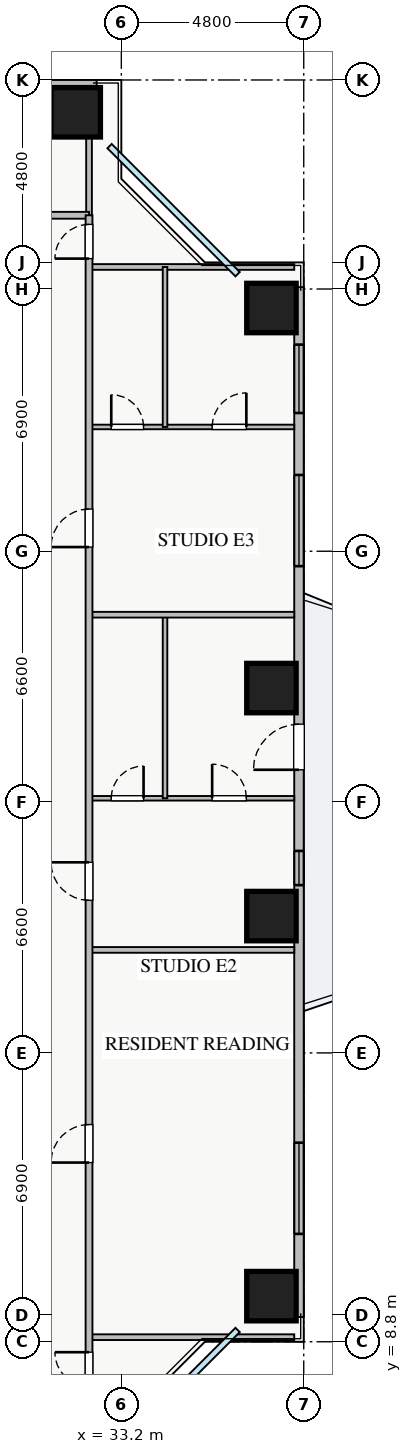
"""IFC4 building model, lengths in metres.
Left out: names, types, materials, properties, quantities, classifications, styles, units other than length and angle.
Written with IfcOpenShell. Run it as: python <this file> out.ifc"""

import sys

from ifc_helpers import new_model, si_unit, direction, frame, frame_2d, origin, origin_2d, place, context, subcontext, project, spatial, rectangle, extrude, source, transform, mapped, element, fill, save


model = new_model("IFC4")
c1 = context("Model", 3, precision=1e-05, world=origin(), true_north=direction((0.0, 1.0)))
c2 = subcontext(c1, "Body", "Model", "MODEL_VIEW")
j1 = project(units=[si_unit("LENGTHUNIT", "METRE"), si_unit("PLANEANGLEUNIT", "RADIAN")], contexts=[c1])
p1 = place(None, origin())
s1 = spatial("IfcSite", under=j1, at=p1, CompositionType="ELEMENT")
p2 = place(p1, origin())
s2 = spatial("IfcBuilding", under=s1, at=p2, CompositionType="ELEMENT")
p3 = place(p2, frame((0.0, 0.0, 39.25)))
s3 = spatial("IfcBuildingStorey", under=s2, at=p3, CompositionType="ELEMENT", Elevation=39.25)
m1 = source(origin(), c2, "Body", "SweptSolid", [
    extrude(rectangle(XDim=1.3, YDim=1.3, at=origin_2d()), origin(), (0.0, 0.0, 1.0), 3.25),
])
for number, where, z_axis, x_axis in (
    (1, (37.15, 10.0, 0.0), (0.0, 0.0, 1.0), (1.0, 0.0, 0.0)),
    (2, (37.15, 20.0, 0.0), (0.0, 0.0, 1.0), (1.0, 0.0, 0.0)),
    (3, (37.15, 26.0, 0.0), (0.0, 0.0, 1.0), (1.0, 0.0, 0.0)),
    (4, (37.15, 36.0, 0.0), (0.0, 0.0, 1.0), (1.0, 0.0, 0.0)),
    (5, (32.0, 41.15, 0.0), (0.0, 0.0, 1.0), (1.0, 0.0, 0.0)),
):
    element("IfcColumn", number, at=place(p3, frame(where, z_axis=z_axis, x_axis=x_axis)), inside=s3, PredefinedType="COLUMN", context=c2, shape_type="MappedRepresentation", body=[
        mapped(m1, transform((0.0, 0.0, 0.0), x_axis=(1.0, 0.0, 0.0), y_axis=(0.0, 1.0, 0.0), z_axis=(0.0, 0.0, 1.0), scale=1.0)),
    ])
p4 = place(p3, frame((5.45, 41.875, 0.0), z_axis=(0.0, 0.0, 1.0), x_axis=(1.0, 0.0, 0.0)))
e6 = element("IfcWall", 6, at=p4, inside=s3, PredefinedType="STANDARD", context=c2, shape_type="SweptSolid", body=[
    extrude(rectangle(XDim=27.1, YDim=0.25, at=frame_2d((13.55, 0.0))), origin(), (0.0, 0.0, 1.0), 2.61),
])
p5 = place(p4, frame((14.4, 0.0, 0.0)))
e7 = element("IfcOpeningElement", 7, at=p5, cuts=e6, PredefinedType="OPENING", context=c2, shape_type="SweptSolid", body=[
    extrude(rectangle(XDim=1.2, YDim=2.1, at=frame_2d((0.6, 1.05))), frame((0.0, 0.135, 0.0), z_axis=(0.0, -1.0, 0.0), x_axis=(1.0, 0.0, 0.0)), (0.0, 0.0, 1.0), 0.27),
])
p6 = place(p4, frame((1.45, 0.0, 0.9)))
e8 = element("IfcOpeningElement", 8, at=p6, cuts=e6, PredefinedType="OPENING", context=c2, shape_type="SweptSolid", body=[
    extrude(rectangle(XDim=1.5, YDim=1.5, at=frame_2d((0.75, 0.75))), frame((0.0, 0.135, 0.0), z_axis=(0.0, -1.0, 0.0), x_axis=(1.0, 0.0, 0.0)), (0.0, 0.0, 1.0), 0.27),
])
p7 = place(p4, frame((7.82, 0.0, 0.9)))
e9 = element("IfcOpeningElement", 9, at=p7, cuts=e6, PredefinedType="OPENING", context=c2, shape_type="SweptSolid", body=[
    extrude(rectangle(XDim=1.8, YDim=1.5, at=frame_2d((0.9, 0.75))), frame((0.0, 0.135, 0.0), z_axis=(0.0, -1.0, 0.0), x_axis=(1.0, 0.0, 0.0)), (0.0, 0.0, 1.0), 0.27),
])
p8 = place(p4, frame((17.92, 0.0, 0.9)))
e10 = element("IfcOpeningElement", 10, at=p8, cuts=e6, PredefinedType="OPENING", context=c2, shape_type="SweptSolid", body=[
    extrude(rectangle(XDim=1.5, YDim=1.5, at=frame_2d((0.75, 0.75))), frame((0.0, 0.135, 0.0), z_axis=(0.0, -1.0, 0.0), x_axis=(1.0, 0.0, 0.0)), (0.0, 0.0, 1.0), 0.27),
])
p9 = place(p4, frame((22.663, 0.0, 0.9)))
e11 = element("IfcOpeningElement", 11, at=p9, cuts=e6, PredefinedType="OPENING", context=c2, shape_type="SweptSolid", body=[
    extrude(rectangle(XDim=2.1, YDim=1.48, at=frame_2d((1.05, 0.74))), frame((0.0, 0.135, 0.0), z_axis=(0.0, -1.0, 0.0), x_axis=(1.0, 0.0, 0.0)), (0.0, 0.0, 1.0), 0.27),
])
p10 = place(p4, frame((5.084, 0.0, 0.9)))
e12 = element("IfcOpeningElement", 12, at=p10, cuts=e6, PredefinedType="OPENING", context=c2, shape_type="SweptSolid", body=[
    extrude(rectangle(XDim=2.4, YDim=1.5, at=frame_2d((1.2, 0.75))), frame((0.0, 0.135, 0.0), z_axis=(0.0, -1.0, 0.0), x_axis=(1.0, 0.0, 0.0)), (0.0, 0.0, 1.0), 0.27),
])
p11 = place(p4, frame((11.002, 0.0, 0.9)))
e13 = element("IfcOpeningElement", 13, at=p11, cuts=e6, PredefinedType="OPENING", context=c2, shape_type="SweptSolid", body=[
    extrude(rectangle(XDim=2.4, YDim=1.5, at=frame_2d((1.2, 0.75))), frame((0.0, 0.135, 0.0), z_axis=(0.0, -1.0, 0.0), x_axis=(1.0, 0.0, 0.0)), (0.0, 0.0, 1.0), 0.27),
])
p12 = place(p3, frame((37.875, 9.45, 0.0), z_axis=(0.0, 0.0, 1.0), x_axis=(0.0, 1.0, 0.0)))
e14 = element("IfcWall", 14, at=p12, inside=s3, PredefinedType="STANDARD", context=c2, shape_type="SweptSolid", body=[
    extrude(rectangle(XDim=27.1, YDim=0.25, at=frame_2d((13.55, 0.0))), origin(), (0.0, 0.0, 1.0), 2.61),
])
p13 = place(p12, frame((14.4, 0.0, 0.0)))
e15 = element("IfcOpeningElement", 15, at=p13, cuts=e14, PredefinedType="OPENING", context=c2, shape_type="SweptSolid", body=[
    extrude(rectangle(XDim=1.2, YDim=2.1, at=frame_2d((0.6, 1.05))), frame((0.0, 0.135, 0.0), z_axis=(0.0, -1.0, 0.0), x_axis=(1.0, 0.0, 0.0)), (0.0, 0.0, 1.0), 0.27),
])
p14 = place(p12, frame((2.188, 0.0, 0.9)))
e16 = element("IfcOpeningElement", 16, at=p14, cuts=e14, PredefinedType="OPENING", context=c2, shape_type="SweptSolid", body=[
    extrude(rectangle(XDim=2.4, YDim=1.48, at=frame_2d((1.2, 0.74))), frame((0.0, 0.135, 0.0), z_axis=(0.0, -1.0, 0.0), x_axis=(1.0, 0.0, 0.0)), (0.0, 0.0, 1.0), 0.27),
])
p15 = place(p12, frame((23.788, 0.0, 0.9)))
e17 = element("IfcOpeningElement", 17, at=p15, cuts=e14, PredefinedType="OPENING", context=c2, shape_type="SweptSolid", body=[
    extrude(rectangle(XDim=1.8, YDim=1.5, at=frame_2d((0.9, 0.75))), frame((0.0, 0.135, 0.0), z_axis=(0.0, -1.0, 0.0), x_axis=(1.0, 0.0, 0.0)), (0.0, 0.0, 1.0), 0.27),
])
p16 = place(p12, frame((19.758, 0.0, 0.9)))
e18 = element("IfcOpeningElement", 18, at=p16, cuts=e14, PredefinedType="OPENING", context=c2, shape_type="SweptSolid", body=[
    extrude(rectangle(XDim=2.4, YDim=1.5, at=frame_2d((1.2, 0.75))), frame((0.0, 0.135, 0.0), z_axis=(0.0, -1.0, 0.0), x_axis=(1.0, 0.0, 0.0)), (0.0, 0.0, 1.0), 0.27),
])
p17 = place(p12, frame((11.365, 0.0, 0.9)))
e19 = element("IfcOpeningElement", 19, at=p17, cuts=e14, PredefinedType="OPENING", context=c2, shape_type="SweptSolid", body=[
    extrude(rectangle(XDim=0.9, YDim=1.2, at=frame_2d((0.45, 0.6))), frame((0.0, 0.135, 0.0), z_axis=(0.0, -1.0, 0.0), x_axis=(1.0, 0.0, 0.0)), (0.0, 0.0, 1.0), 0.27),
])
p18 = place(p3, frame((32.35, 38.44, 0.0), z_axis=(0.0, 0.0, 1.0), x_axis=(0.0, 1.0, 0.0)))
e20 = element("IfcWall", 20, at=p18, inside=s3, PredefinedType="PARTITIONING", context=c2, shape_type="SweptSolid", body=[
    extrude(rectangle(XDim=3.31, YDim=0.15, at=frame_2d((1.655, 0.0))), origin(), (0.0, 0.0, 1.0), 3.07),
])
p19 = place(p3, frame((8.72, 38.44, 0.0), z_axis=(0.0, 0.0, 1.0), x_axis=(1.0, 0.0, 0.0)))
e21 = element("IfcWall", 21, at=p19, inside=s3, PredefinedType="PARTITIONING", context=c2, shape_type="SweptSolid", body=[
    extrude(rectangle(XDim=23.63, YDim=0.18, at=frame_2d((11.815, 0.0))), origin(), (0.0, 0.0, 1.0), 3.07),
])
p20 = place(p19, frame((2.86, 0.0, 0.0)))
e22 = element("IfcOpeningElement", 22, at=p20, cuts=e21, PredefinedType="OPENING", context=c2, shape_type="SweptSolid", body=[
    extrude(rectangle(XDim=1.0, YDim=2.05, at=frame_2d((0.5, 1.025))), frame((0.0, 0.1, 0.0), z_axis=(0.0, -1.0, 0.0), x_axis=(1.0, 0.0, 0.0)), (0.0, 0.0, 1.0), 0.2),
])
p21 = place(p19, frame((9.4, 0.0, 0.0)))
e23 = element("IfcOpeningElement", 23, at=p21, cuts=e21, PredefinedType="OPENING", context=c2, shape_type="SweptSolid", body=[
    extrude(rectangle(XDim=1.0, YDim=2.05, at=frame_2d((0.5, 1.025))), frame((0.0, 0.1, 0.0), z_axis=(0.0, -1.0, 0.0), x_axis=(1.0, 0.0, 0.0)), (0.0, 0.0, 1.0), 0.2),
])
p22 = place(p19, frame((14.9, 0.0, 0.0)))
e24 = element("IfcOpeningElement", 24, at=p22, cuts=e21, PredefinedType="OPENING", context=c2, shape_type="SweptSolid", body=[
    extrude(rectangle(XDim=1.0, YDim=2.05, at=frame_2d((0.5, 1.025))), frame((0.0, 0.1, 0.0), z_axis=(0.0, -1.0, 0.0), x_axis=(1.0, 0.0, 0.0)), (0.0, 0.0, 1.0), 0.2),
])
p23 = place(p19, frame((20.175, 0.0, 0.0)))
e25 = element("IfcOpeningElement", 25, at=p23, cuts=e21, PredefinedType="OPENING", context=c2, shape_type="SweptSolid", body=[
    extrude(rectangle(XDim=1.0, YDim=2.05, at=frame_2d((0.5, 1.025))), frame((0.0, 0.1, 0.0), z_axis=(0.0, -1.0, 0.0), x_axis=(1.0, 0.0, 0.0)), (0.0, 0.0, 1.0), 0.2),
])
for number, where, z_axis, x_axis in (
    (26, (32.35, 37.08, 0.0), (0.0, 0.0, 1.0), (1.0, 0.0, 0.0)),
    (27, (32.35, 8.92, 0.0), (0.0, 0.0, 1.0), (1.0, 0.0, 0.0)),
):
    element("IfcWall", number, at=place(p3, frame(where, z_axis=z_axis, x_axis=x_axis)), inside=s3, PredefinedType="PARTITIONING", context=c2, shape_type="SweptSolid", body=[
        extrude(rectangle(XDim=5.4, YDim=0.15, at=frame_2d((2.7, 0.0))), origin(), (0.0, 0.0, 1.0), 3.07),
    ])
p24 = place(p3, frame((32.35, 23.1, 0.0), z_axis=(0.0, 0.0, 1.0), x_axis=(1.0, 0.0, 0.0)))
e28 = element("IfcWall", 28, at=p24, inside=s3, PredefinedType="PLUMBINGWALL", context=c2, shape_type="SweptSolid", body=[
    extrude(rectangle(XDim=5.4, YDim=0.12, at=frame_2d((2.7, 0.0))), origin(), (0.0, 0.0, 1.0), 3.07),
])
p25 = place(p24, frame((0.585, 0.0, 0.0)))
e29 = element("IfcOpeningElement", 29, at=p25, cuts=e28, PredefinedType="OPENING", context=c2, shape_type="SweptSolid", body=[
    extrude(rectangle(XDim=0.85, YDim=2.05, at=frame_2d((0.425, 1.025))), frame((0.0, 0.07, 0.0), z_axis=(0.0, -1.0, 0.0), x_axis=(1.0, 0.0, 0.0)), (0.0, 0.0, 1.0), 0.14),
])
p26 = place(p24, frame((3.24, 0.0, 0.0)))
e30 = element("IfcOpeningElement", 30, at=p26, cuts=e28, PredefinedType="OPENING", context=c2, shape_type="SweptSolid", body=[
    extrude(rectangle(XDim=0.9, YDim=2.05, at=frame_2d((0.45, 1.025))), frame((0.0, 0.07, 0.0), z_axis=(0.0, -1.0, 0.0), x_axis=(1.0, 0.0, 0.0)), (0.0, 0.0, 1.0), 0.14),
])
p27 = place(p3, frame((34.35, 23.1, 0.0), z_axis=(0.0, 0.0, 1.0), x_axis=(0.0, 1.0, 0.0)))
e31 = element("IfcWall", 31, at=p27, inside=s3, PredefinedType="PLUMBINGWALL", context=c2, shape_type="SweptSolid", body=[
    extrude(rectangle(XDim=4.83, YDim=0.12, at=frame_2d((2.415, 0.0))), origin(), (0.0, 0.0, 1.0), 3.07),
])
p28 = place(p3, frame((32.35, 19.11, 0.0), z_axis=(0.0, 0.0, 1.0), x_axis=(1.0, 0.0, 0.0)))
e32 = element("IfcWall", 32, at=p28, inside=s3, PredefinedType="PARTITIONING", context=c2, shape_type="SweptSolid", body=[
    extrude(rectangle(XDim=5.4, YDim=0.15, at=frame_2d((2.7, 0.0))), origin(), (0.0, 0.0, 1.0), 3.07),
])
p29 = place(p3, frame((32.35, 32.87, 0.0), z_axis=(0.0, 0.0, 1.0), x_axis=(1.0, 0.0, 0.0)))
e33 = element("IfcWall", 33, at=p29, inside=s3, PredefinedType="PLUMBINGWALL", context=c2, shape_type="SweptSolid", body=[
    extrude(rectangle(XDim=5.4, YDim=0.12, at=frame_2d((2.7, 0.0))), origin(), (0.0, 0.0, 1.0), 3.07),
])
p30 = place(p29, frame((0.585, 0.0, 0.0)))
e34 = element("IfcOpeningElement", 34, at=p30, cuts=e33, PredefinedType="OPENING", context=c2, shape_type="SweptSolid", body=[
    extrude(rectangle(XDim=0.85, YDim=2.05, at=frame_2d((0.425, 1.025))), frame((0.0, 0.07, 0.0), z_axis=(0.0, -1.0, 0.0), x_axis=(1.0, 0.0, 0.0)), (0.0, 0.0, 1.0), 0.14),
])
p31 = place(p29, frame((3.24, 0.0, 0.0)))
e35 = element("IfcOpeningElement", 35, at=p31, cuts=e33, PredefinedType="OPENING", context=c2, shape_type="SweptSolid", body=[
    extrude(rectangle(XDim=0.9, YDim=2.05, at=frame_2d((0.45, 1.025))), frame((0.0, 0.07, 0.0), z_axis=(0.0, -1.0, 0.0), x_axis=(1.0, 0.0, 0.0)), (0.0, 0.0, 1.0), 0.14),
])
p32 = place(p3, frame((34.35, 32.87, 0.0), z_axis=(0.0, 0.0, 1.0), x_axis=(0.0, 1.0, 0.0)))
e36 = element("IfcWall", 36, at=p32, inside=s3, PredefinedType="PLUMBINGWALL", context=c2, shape_type="SweptSolid", body=[
    extrude(rectangle(XDim=4.21, YDim=0.12, at=frame_2d((2.105, 0.0))), origin(), (0.0, 0.0, 1.0), 3.07),
])
p33 = place(p3, frame((32.35, 27.93, 0.0), z_axis=(0.0, 0.0, 1.0), x_axis=(1.0, 0.0, 0.0)))
e37 = element("IfcWall", 37, at=p33, inside=s3, PredefinedType="PARTITIONING", context=c2, shape_type="SweptSolid", body=[
    extrude(rectangle(XDim=5.4, YDim=0.15, at=frame_2d((2.7, 0.0))), origin(), (0.0, 0.0, 1.0), 2.765),
])
p34 = place(p3, frame((32.35, 7.21, 0.0), z_axis=(0.0, 0.0, 1.0), x_axis=(0.0, 1.0, 0.0)))
e38 = element("IfcWall", 38, at=p34, inside=s3, PredefinedType="PARTITIONING", context=c2, shape_type="SweptSolid", body=[
    extrude(rectangle(XDim=31.23, YDim=0.18, at=frame_2d((15.615, 0.0))), origin(), (0.0, 0.0, 1.0), 2.821),
])
p35 = place(p34, frame((30.09, 0.0, 0.0)))
e39 = element("IfcOpeningElement", 39, at=p35, cuts=e38, PredefinedType="OPENING", context=c2, shape_type="SweptSolid", body=[
    extrude(rectangle(XDim=0.9, YDim=2.05, at=frame_2d((0.45, 1.025))), frame((0.0, 0.1, 0.0), z_axis=(0.0, -1.0, 0.0), x_axis=(1.0, 0.0, 0.0)), (0.0, 0.0, 1.0), 0.2),
])
p36 = place(p34, frame((0.415, 0.0, 0.0)))
e40 = element("IfcOpeningElement", 40, at=p36, cuts=e38, PredefinedType="OPENING", context=c2, shape_type="SweptSolid", body=[
    extrude(rectangle(XDim=0.9, YDim=2.05, at=frame_2d((0.45, 1.025))), frame((0.0, 0.1, 0.0), z_axis=(0.0, -1.0, 0.0), x_axis=(1.0, 0.0, 0.0)), (0.0, 0.0, 1.0), 0.2),
])
p37 = place(p34, frame((6.305, 0.0, 0.0)))
e41 = element("IfcOpeningElement", 41, at=p37, cuts=e38, PredefinedType="OPENING", context=c2, shape_type="SweptSolid", body=[
    extrude(rectangle(XDim=1.0, YDim=2.05, at=frame_2d((0.5, 1.025))), frame((0.0, 0.1, 0.0), z_axis=(0.0, -1.0, 0.0), x_axis=(1.0, 0.0, 0.0)), (0.0, 0.0, 1.0), 0.2),
])
p38 = place(p34, frame((13.205, 0.0, 0.0)))
e42 = element("IfcOpeningElement", 42, at=p38, cuts=e38, PredefinedType="OPENING", context=c2, shape_type="SweptSolid", body=[
    extrude(rectangle(XDim=1.0, YDim=2.05, at=frame_2d((0.5, 1.025))), frame((0.0, 0.1, 0.0), z_axis=(0.0, -1.0, 0.0), x_axis=(1.0, 0.0, 0.0)), (0.0, 0.0, 1.0), 0.2),
])
p39 = place(p34, frame((22.5, 0.0, 0.0)))
e43 = element("IfcOpeningElement", 43, at=p39, cuts=e38, PredefinedType="OPENING", context=c2, shape_type="SweptSolid", body=[
    extrude(rectangle(XDim=1.0, YDim=2.05, at=frame_2d((0.5, 1.025))), frame((0.0, 0.1, 0.0), z_axis=(0.0, -1.0, 0.0), x_axis=(1.0, 0.0, 0.0)), (0.0, 0.0, 1.0), 0.2),
])
m2 = source(origin(), c2, "Body", "SweptSolid", [
    extrude(rectangle(XDim=1.2, YDim=2.1, at=frame_2d((0.6, 1.05))), frame((0.0, 0.025, 0.0), z_axis=(0.0, -1.0, 0.0), x_axis=(1.0, 0.0, 0.0)), (0.0, 0.0, 1.0), 0.05),
])
p40 = place(p13, origin())
e44 = element("IfcDoor", 44, at=p40, inside=s3, OperationType="SINGLE_SWING_LEFT", PredefinedType="DOOR", context=c2, shape_type="MappedRepresentation", body=[
    mapped(m2, transform((0.0, 0.0, 0.0), x_axis=(1.0, 0.0, 0.0), y_axis=(0.0, 1.0, 0.0), z_axis=(0.0, 0.0, 1.0), scale=1.0)),
])
fill(e15, e44)
m3 = source(origin(), c2, "Body", "SweptSolid", [
    extrude(rectangle(XDim=2.4, YDim=1.48, at=frame_2d((1.2, 0.74))), frame((0.0, 0.03, 0.0), z_axis=(0.0, -1.0, 0.0), x_axis=(1.0, 0.0, 0.0)), (0.0, 0.0, 1.0), 0.06),
])
p41 = place(p14, origin())
e45 = element("IfcWindow", 45, at=p41, inside=s3, PartitioningType="TRIPLE_PANEL_VERTICAL", PredefinedType="WINDOW", context=c2, shape_type="MappedRepresentation", body=[
    mapped(m3, transform((0.0, 0.0, 0.0), x_axis=(1.0, 0.0, 0.0), y_axis=(0.0, 1.0, 0.0), z_axis=(0.0, 0.0, 1.0), scale=1.0)),
])
fill(e16, e45)
m4 = source(origin(), c2, "Body", "SweptSolid", [
    extrude(rectangle(XDim=1.8, YDim=1.5, at=frame_2d((0.9, 0.75))), frame((0.0, 0.03, 0.0), z_axis=(0.0, -1.0, 0.0), x_axis=(1.0, 0.0, 0.0)), (0.0, 0.0, 1.0), 0.06),
])
p42 = place(p15, origin())
e46 = element("IfcWindow", 46, at=p42, inside=s3, PartitioningType="TRIPLE_PANEL_VERTICAL", PredefinedType="WINDOW", context=c2, shape_type="MappedRepresentation", body=[
    mapped(m4, transform((0.0, 0.0, 0.0), x_axis=(1.0, 0.0, 0.0), y_axis=(0.0, 1.0, 0.0), z_axis=(0.0, 0.0, 1.0), scale=1.0)),
])
fill(e17, e46)
m5 = source(origin(), c2, "Body", "SweptSolid", [
    extrude(rectangle(XDim=0.85, YDim=2.05, at=frame_2d((0.425, 1.025))), frame((0.0, 0.025, 0.0), z_axis=(0.0, -1.0, 0.0), x_axis=(1.0, 0.0, 0.0)), (0.0, 0.0, 1.0), 0.05),
])
p43 = place(p25, origin())
e47 = element("IfcDoor", 47, at=p43, inside=s3, OperationType="SINGLE_SWING_RIGHT", PredefinedType="DOOR", context=c2, shape_type="MappedRepresentation", body=[
    mapped(m5, transform((0.0, 0.0, 0.0), x_axis=(1.0, 0.0, 0.0), y_axis=(0.0, 1.0, 0.0), z_axis=(0.0, 0.0, 1.0), scale=1.0)),
])
fill(e29, e47)
m6 = source(origin(), c2, "Body", "SweptSolid", [
    extrude(rectangle(XDim=0.9, YDim=2.05, at=frame_2d((0.45, 1.025))), frame((0.0, 0.025, 0.0), z_axis=(0.0, -1.0, 0.0), x_axis=(1.0, 0.0, 0.0)), (0.0, 0.0, 1.0), 0.05),
])
p44 = place(p26, origin())
e48 = element("IfcDoor", 48, at=p44, inside=s3, OperationType="SINGLE_SWING_LEFT", PredefinedType="DOOR", context=c2, shape_type="MappedRepresentation", body=[
    mapped(m6, transform((0.0, 0.0, 0.0), x_axis=(1.0, 0.0, 0.0), y_axis=(0.0, 1.0, 0.0), z_axis=(0.0, 0.0, 1.0), scale=1.0)),
])
fill(e30, e48)
p45 = place(p30, origin())
e49 = element("IfcDoor", 49, at=p45, inside=s3, OperationType="SINGLE_SWING_LEFT", PredefinedType="DOOR", context=c2, shape_type="MappedRepresentation", body=[
    mapped(m5, transform((0.0, 0.0, 0.0), x_axis=(1.0, 0.0, 0.0), y_axis=(0.0, 1.0, 0.0), z_axis=(0.0, 0.0, 1.0), scale=1.0)),
])
fill(e34, e49)
p46 = place(p31, origin())
e50 = element("IfcDoor", 50, at=p46, inside=s3, OperationType="SINGLE_SWING_RIGHT", PredefinedType="DOOR", context=c2, shape_type="MappedRepresentation", body=[
    mapped(m6, transform((0.0, 0.0, 0.0), x_axis=(1.0, 0.0, 0.0), y_axis=(0.0, 1.0, 0.0), z_axis=(0.0, 0.0, 1.0), scale=1.0)),
])
fill(e35, e50)
p47 = place(p35, origin())
e51 = element("IfcDoor", 51, at=p47, inside=s3, OperationType="SINGLE_SWING_LEFT", PredefinedType="DOOR", context=c2, shape_type="MappedRepresentation", body=[
    mapped(m6, transform((0.0, 0.0, 0.0), x_axis=(1.0, 0.0, 0.0), y_axis=(0.0, 1.0, 0.0), z_axis=(0.0, 0.0, 1.0), scale=1.0)),
])
fill(e39, e51)
p48 = place(p36, origin())
e52 = element("IfcDoor", 52, at=p48, inside=s3, OperationType="SINGLE_SWING_RIGHT", PredefinedType="DOOR", context=c2, shape_type="MappedRepresentation", body=[
    mapped(m6, transform((0.0, 0.0, 0.0), x_axis=(1.0, 0.0, 0.0), y_axis=(0.0, 1.0, 0.0), z_axis=(0.0, 0.0, 1.0), scale=1.0)),
])
fill(e40, e52)
m7 = source(origin(), c2, "Body", "SweptSolid", [
    extrude(rectangle(XDim=1.0, YDim=2.05, at=frame_2d((0.5, 1.025))), frame((0.0, 0.025, 0.0), z_axis=(0.0, -1.0, 0.0), x_axis=(1.0, 0.0, 0.0)), (0.0, 0.0, 1.0), 0.05),
])
p49 = place(p37, origin())
e53 = element("IfcDoor", 53, at=p49, inside=s3, OperationType="SINGLE_SWING_LEFT", PredefinedType="DOOR", context=c2, shape_type="MappedRepresentation", body=[
    mapped(m7, transform((0.0, 0.0, 0.0), x_axis=(1.0, 0.0, 0.0), y_axis=(0.0, 1.0, 0.0), z_axis=(0.0, 0.0, 1.0), scale=1.0)),
])
fill(e41, e53)
p50 = place(p38, origin())
e54 = element("IfcDoor", 54, at=p50, inside=s3, OperationType="SINGLE_SWING_RIGHT", PredefinedType="DOOR", context=c2, shape_type="MappedRepresentation", body=[
    mapped(m7, transform((0.0, 0.0, 0.0), x_axis=(1.0, 0.0, 0.0), y_axis=(0.0, 1.0, 0.0), z_axis=(0.0, 0.0, 1.0), scale=1.0)),
])
fill(e42, e54)
p51 = place(p39, origin())
e55 = element("IfcDoor", 55, at=p51, inside=s3, OperationType="SINGLE_SWING_LEFT", PredefinedType="DOOR", context=c2, shape_type="MappedRepresentation", body=[
    mapped(m7, transform((0.0, 0.0, 0.0), x_axis=(1.0, 0.0, 0.0), y_axis=(0.0, 1.0, 0.0), z_axis=(0.0, 0.0, 1.0), scale=1.0)),
])
fill(e43, e55)
m8 = source(origin(), c2, "Body", "SweptSolid", [
    extrude(rectangle(XDim=2.4, YDim=1.5, at=frame_2d((1.2, 0.75))), frame((0.0, 0.03, 0.0), z_axis=(0.0, -1.0, 0.0), x_axis=(1.0, 0.0, 0.0)), (0.0, 0.0, 1.0), 0.06),
])
p52 = place(p16, origin())
e56 = element("IfcWindow", 56, at=p52, inside=s3, PartitioningType="TRIPLE_PANEL_VERTICAL", PredefinedType="WINDOW", context=c2, shape_type="MappedRepresentation", body=[
    mapped(m8, transform((0.0, 0.0, 0.0), x_axis=(1.0, 0.0, 0.0), y_axis=(0.0, 1.0, 0.0), z_axis=(0.0, 0.0, 1.0), scale=1.0)),
])
fill(e18, e56)
m9 = source(origin(), c2, "Body", "SweptSolid", [
    extrude(rectangle(XDim=0.9, YDim=1.2, at=frame_2d((0.45, 0.6))), frame((0.0, 0.03, 0.0), z_axis=(0.0, -1.0, 0.0), x_axis=(1.0, 0.0, 0.0)), (0.0, 0.0, 1.0), 0.06),
])
p53 = place(p17, origin())
e57 = element("IfcWindow", 57, at=p53, inside=s3, PartitioningType="SINGLE_PANEL", PredefinedType="WINDOW", context=c2, shape_type="MappedRepresentation", body=[
    mapped(m9, transform((0.0, 0.0, 0.0), x_axis=(1.0, 0.0, 0.0), y_axis=(0.0, 1.0, 0.0), z_axis=(0.0, 0.0, 1.0), scale=1.0)),
])
fill(e19, e57)
save(model, sys.argv[1])
